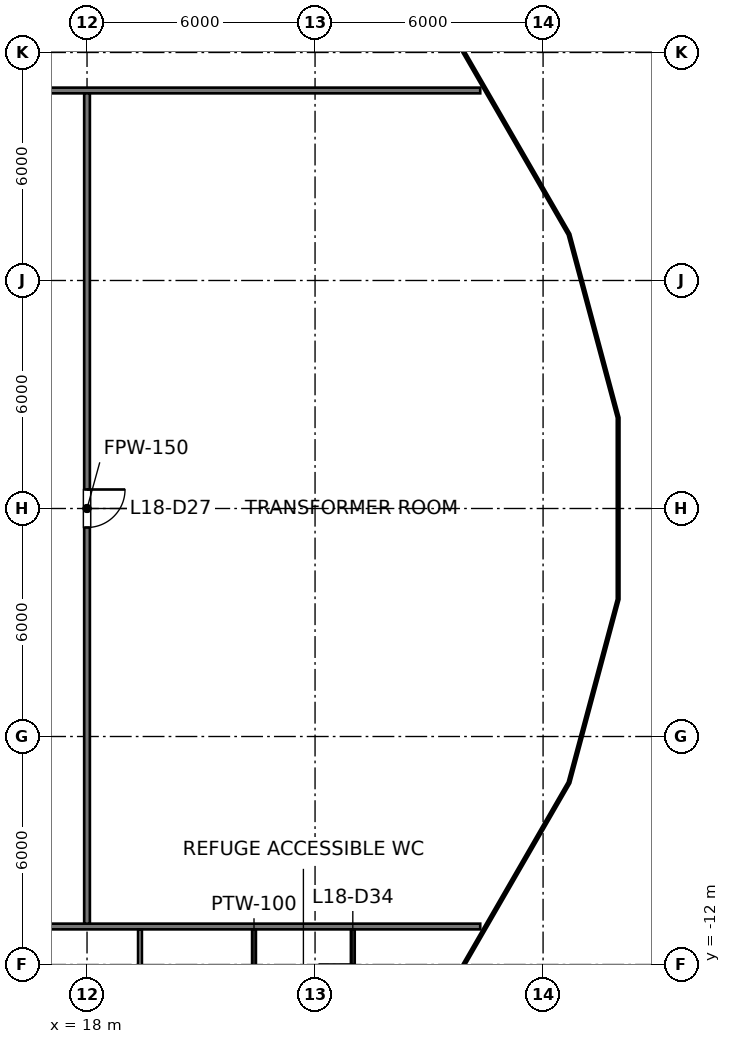
"""IFC4 building model, lengths in metres.
Left out: names, types, materials, properties, quantities, classifications, styles, units other than length and angle.
Written with IfcOpenShell. Run it as: python <this file> out.ifc"""

import sys

from ifc_helpers import new_model, si_unit, direction, frame, frame_2d, origin, place, context, subcontext, project, spatial, rectangle, extrude, element, fill, save


model = new_model("IFC4")
c1 = context("Model", 3, precision=1e-05, world=origin(), true_north=direction((0.0, 1.0)))
c2 = subcontext(c1, "Body", "Model", "MODEL_VIEW")
j1 = project(units=[si_unit("LENGTHUNIT", "METRE"), si_unit("PLANEANGLEUNIT", "RADIAN")], contexts=[c1])
p1 = place(None, origin())
s1 = spatial("IfcSite", under=j1, at=p1, CompositionType="ELEMENT")
p2 = place(p1, origin())
s2 = spatial("IfcBuilding", under=s1, at=p2, CompositionType="ELEMENT")
p3 = place(p2, frame((0.0, 0.0, 96.6)))
s3 = spatial("IfcBuildingStorey", under=s2, at=p3, CompositionType="ELEMENT", Elevation=96.6)
p4 = place(p3, frame((-28.346, 11.0, 0.0), z_axis=(0.0, 0.0, 1.0), x_axis=(1.0, 0.0, 0.0)))
e1 = element("IfcWall", 1, at=p4, inside=s3, PredefinedType="PARTITIONING", context=c2, shape_type="SweptSolid", body=[
    extrude(rectangle(XDim=56.692, YDim=0.15, at=frame_2d((28.346, 0.0))), origin(), (0.0, 0.0, 1.0), 4.327),
])
p5 = place(p4, frame((12.45, 0.0, 0.0)))
e2 = element("IfcOpeningElement", 2, at=p5, cuts=e1, PredefinedType="OPENING", context=c2, shape_type="SweptSolid", body=[
    extrude(rectangle(XDim=1.0, YDim=2.1, at=frame_2d((0.5, 1.05))), frame((0.0, 0.075, 0.0), z_axis=(0.0, -1.0, 0.0), x_axis=(1.0, 0.0, 0.0)), (0.0, 0.0, 1.0), 0.15),
])
p6 = place(p4, frame((19.45, 0.0, 0.0)))
e3 = element("IfcOpeningElement", 3, at=p6, cuts=e1, PredefinedType="OPENING", context=c2, shape_type="SweptSolid", body=[
    extrude(rectangle(XDim=1.0, YDim=2.1, at=frame_2d((0.5, 1.05))), frame((0.0, 0.075, 0.0), z_axis=(0.0, -1.0, 0.0), x_axis=(1.0, 0.0, 0.0)), (0.0, 0.0, 1.0), 0.15),
])
p7 = place(p4, frame((34.65, 0.0, 0.0)))
e4 = element("IfcOpeningElement", 4, at=p7, cuts=e1, PredefinedType="OPENING", context=c2, shape_type="SweptSolid", body=[
    extrude(rectangle(XDim=1.0, YDim=2.1, at=frame_2d((0.5, 1.05))), frame((0.0, 0.075, 0.0), z_axis=(0.0, -1.0, 0.0), x_axis=(1.0, 0.0, 0.0)), (0.0, 0.0, 1.0), 0.15),
])
p8 = place(p4, frame((42.6, 0.0, 0.0)))
e5 = element("IfcOpeningElement", 5, at=p8, cuts=e1, PredefinedType="OPENING", context=c2, shape_type="SweptSolid", body=[
    extrude(rectangle(XDim=1.0, YDim=2.1, at=frame_2d((0.5, 1.05))), frame((0.0, 0.075, 0.0), z_axis=(0.0, -1.0, 0.0), x_axis=(1.0, 0.0, 0.0)), (0.0, 0.0, 1.0), 0.15),
])
p9 = place(p4, frame((26.45, 0.0, 0.0)))
e6 = element("IfcOpeningElement", 6, at=p9, cuts=e1, PredefinedType="OPENING", context=c2, shape_type="SweptSolid", body=[
    extrude(rectangle(XDim=1.8, YDim=2.1, at=frame_2d((0.9, 1.05))), frame((0.0, 0.075, 0.0), z_axis=(0.0, -1.0, 0.0), x_axis=(1.0, 0.0, 0.0)), (0.0, 0.0, 1.0), 0.15),
])
p10 = place(p3, frame((-28.346, -11.0, 0.0), z_axis=(0.0, 0.0, 1.0), x_axis=(1.0, 0.0, 0.0)))
e7 = element("IfcWall", 7, at=p10, inside=s3, PredefinedType="PARTITIONING", context=c2, shape_type="SweptSolid", body=[
    extrude(rectangle(XDim=56.692, YDim=0.15, at=frame_2d((28.346, 0.0))), origin(), (0.0, 0.0, 1.0), 4.327),
])
p11 = place(p10, frame((13.6, 0.0, 0.0)))
e8 = element("IfcOpeningElement", 8, at=p11, cuts=e7, PredefinedType="OPENING", context=c2, shape_type="SweptSolid", body=[
    extrude(rectangle(XDim=1.0, YDim=2.1, at=frame_2d((0.5, 1.05))), frame((0.0, 0.075, 0.0), z_axis=(0.0, -1.0, 0.0), x_axis=(1.0, 0.0, 0.0)), (0.0, 0.0, 1.0), 0.15),
])
p12 = place(p10, frame((21.55, 0.0, 0.0)))
e9 = element("IfcOpeningElement", 9, at=p12, cuts=e7, PredefinedType="OPENING", context=c2, shape_type="SweptSolid", body=[
    extrude(rectangle(XDim=1.0, YDim=2.1, at=frame_2d((0.5, 1.05))), frame((0.0, 0.075, 0.0), z_axis=(0.0, -1.0, 0.0), x_axis=(1.0, 0.0, 0.0)), (0.0, 0.0, 1.0), 0.15),
])
p13 = place(p10, frame((37.85, 0.0, 0.0)))
e10 = element("IfcOpeningElement", 10, at=p13, cuts=e7, PredefinedType="OPENING", context=c2, shape_type="SweptSolid", body=[
    extrude(rectangle(XDim=1.8, YDim=2.1, at=frame_2d((0.9, 1.05))), frame((0.0, 0.075, 0.0), z_axis=(0.0, -1.0, 0.0), x_axis=(1.0, 0.0, 0.0)), (0.0, 0.0, 1.0), 0.15),
])
p14 = place(p10, frame((43.15, 0.0, 0.0)))
e11 = element("IfcOpeningElement", 11, at=p14, cuts=e7, PredefinedType="OPENING", context=c2, shape_type="SweptSolid", body=[
    extrude(rectangle(XDim=1.8, YDim=2.1, at=frame_2d((0.9, 1.05))), frame((0.0, 0.075, 0.0), z_axis=(0.0, -1.0, 0.0), x_axis=(1.0, 0.0, 0.0)), (0.0, 0.0, 1.0), 0.15),
])
p15 = place(p10, frame((28.45, 0.0, 0.0)))
e12 = element("IfcOpeningElement", 12, at=p15, cuts=e7, PredefinedType="OPENING", context=c2, shape_type="SweptSolid", body=[
    extrude(rectangle(XDim=1.8, YDim=2.1, at=frame_2d((0.9, 1.05))), frame((0.0, 0.075, 0.0), z_axis=(0.0, -1.0, 0.0), x_axis=(1.0, 0.0, 0.0)), (0.0, 0.0, 1.0), 0.15),
])
p16 = place(p3, frame((18.0, -10.925, 0.0), z_axis=(0.0, 0.0, 1.0), x_axis=(0.0, 1.0, 0.0)))
e13 = element("IfcWall", 13, at=p16, inside=s3, PredefinedType="PARTITIONING", context=c2, shape_type="SweptSolid", body=[
    extrude(rectangle(XDim=21.85, YDim=0.15, at=frame_2d((10.925, 0.0))), origin(), (0.0, 0.0, 1.0), 4.327),
])
p17 = place(p16, frame((10.425, 0.0, 0.0)))
e14 = element("IfcOpeningElement", 14, at=p17, cuts=e13, PredefinedType="OPENING", context=c2, shape_type="SweptSolid", body=[
    extrude(rectangle(XDim=1.0, YDim=2.1, at=frame_2d((0.5, 1.05))), frame((0.0, 0.075, 0.0), z_axis=(0.0, -1.0, 0.0), x_axis=(1.0, 0.0, 0.0)), (0.0, 0.0, 1.0), 0.15),
])
for number, where, z_axis, x_axis in (
    (15, (19.394, -13.925, 0.0), (0.0, 0.0, 1.0), (0.0, 1.0, 0.0)),
    (16, (22.394, -13.925, 0.0), (0.0, 0.0, 1.0), (0.0, 1.0, 0.0)),
):
    element("IfcWall", number, at=place(p3, frame(where, z_axis=z_axis, x_axis=x_axis)), inside=s3, PredefinedType="PARTITIONING", context=c2, shape_type="SweptSolid", body=[
        extrude(rectangle(XDim=2.85, YDim=0.1, at=frame_2d((1.425, 0.0))), origin(), (0.0, 0.0, 1.0), 4.552),
    ])
p18 = place(p3, frame((24.993, -13.925, 0.0), z_axis=(0.0, 0.0, 1.0), x_axis=(0.0, 1.0, 0.0)))
e17 = element("IfcWall", 17, at=p18, inside=s3, PredefinedType="PARTITIONING", context=c2, shape_type="SweptSolid", body=[
    extrude(rectangle(XDim=2.85, YDim=0.1, at=frame_2d((1.425, 0.0))), origin(), (0.0, 0.0, 1.0), 5.25),
])
p19 = place(p18, frame((1.025, 0.0, 0.0)))
e18 = element("IfcOpeningElement", 18, at=p19, cuts=e17, PredefinedType="OPENING", context=c2, shape_type="SweptSolid", body=[
    extrude(rectangle(XDim=0.9, YDim=2.1, at=frame_2d((0.45, 1.05))), frame((0.0, 0.05, 0.0), z_axis=(0.0, -1.0, 0.0), x_axis=(1.0, 0.0, 0.0)), (0.0, 0.0, 1.0), 0.1),
])
p20 = place(p17, origin())
e19 = element("IfcDoor", 19, at=p20, inside=s3, OperationType="SINGLE_SWING_RIGHT", PredefinedType="DOOR", context=c2, shape_type="SweptSolid", body=[
    extrude(rectangle(XDim=1.0, YDim=2.1, at=frame_2d((0.5, 1.05))), frame((0.0, 0.025, 0.0), z_axis=(0.0, -1.0, 0.0), x_axis=(1.0, 0.0, 0.0)), (0.0, 0.0, 1.0), 0.05),
])
fill(e14, e19)
save(model, sys.argv[1])
